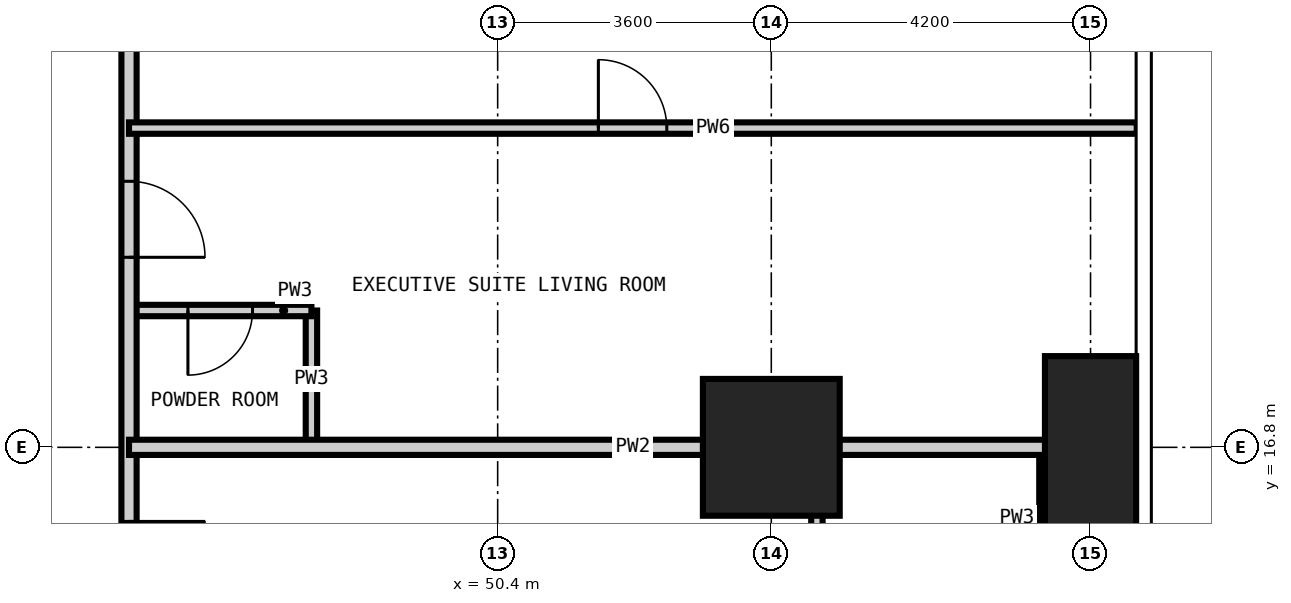
"""IFC4 building model, lengths in metres.
Left out: names, types, materials, properties, quantities, classifications, styles, units other than length and angle.
Written with IfcOpenShell. Run it as: python <this file> out.ifc"""

import sys

from ifc_helpers import new_model, si_unit, direction, frame, frame_2d, origin, origin_2d, place, context, subcontext, project, spatial, rectangle, extrude, element, fill, save


model = new_model("IFC4")
c1 = context("Model", 3, precision=1e-05, world=origin(), true_north=direction((0.0, 1.0)))
c2 = subcontext(c1, "Body", "Model", "MODEL_VIEW")
j1 = project(units=[si_unit("LENGTHUNIT", "METRE"), si_unit("PLANEANGLEUNIT", "RADIAN")], contexts=[c1])
p1 = place(None, origin())
s1 = spatial("IfcSite", under=j1, at=p1, CompositionType="ELEMENT")
p2 = place(p1, origin())
s2 = spatial("IfcBuilding", under=s1, at=p2, CompositionType="ELEMENT")
p3 = place(p2, frame((0.0, 0.0, 55.8)))
s3 = spatial("IfcBuildingStorey", under=s2, at=p3, CompositionType="ELEMENT", Elevation=55.8)
p4 = place(p3, frame((54.0, 16.8, -0.35), z_axis=(0.0, 0.0, 1.0), x_axis=(1.0, 0.0, 0.0)))
e1 = element("IfcColumn", 1, at=p4, inside=s3, PredefinedType="COLUMN", context=c2, shape_type="SweptSolid", body=[
    extrude(rectangle(XDim=1.8, YDim=1.8, at=origin_2d()), origin(), (0.0, 0.0, 1.0), 3.6),
])
p5 = place(p3, frame((58.2, 16.8, -0.35), z_axis=(0.0, 0.0, 1.0), x_axis=(1.0, 0.0, 0.0)))
e2 = element("IfcColumn", 2, at=p5, inside=s3, PredefinedType="COLUMN", context=c2, shape_type="SweptSolid", body=[
    extrude(rectangle(XDim=1.2, YDim=2.4, at=origin_2d()), origin(), (0.0, 0.0, 1.0), 3.6),
])
p6 = place(p3, frame((47.95, 16.8, 0.0), z_axis=(0.0, 0.0, 1.0), x_axis=(0.0, 1.0, 0.0)))
e3 = element("IfcWall", 3, at=p6, inside=s3, PredefinedType="PARTITIONING", context=c2, shape_type="SweptSolid", body=[
    extrude(rectangle(XDim=1.8, YDim=0.15, at=frame_2d((0.9, 0.0))), origin(), (0.0, 0.0, 1.0), 3.25),
])
p7 = place(p3, frame((57.6, 13.2, 0.0), z_axis=(0.0, 0.0, 1.0), x_axis=(0.0, 1.0, 0.0)))
e4 = element("IfcWall", 4, at=p7, inside=s3, PredefinedType="PARTITIONING", context=c2, shape_type="SweptSolid", body=[
    extrude(rectangle(XDim=3.6, YDim=0.15, at=frame_2d((1.8, 0.0))), origin(), (0.0, 0.0, 1.0), 3.25),
])
p8 = place(p7, frame((1.375, 0.0, 0.0)))
e5 = element("IfcOpeningElement", 5, at=p8, cuts=e4, PredefinedType="OPENING", context=c2, shape_type="SweptSolid", body=[
    extrude(rectangle(XDim=0.85, YDim=2.1, at=frame_2d((0.425, 1.05))), frame((0.0, 0.085, 0.0), z_axis=(0.0, -1.0, 0.0), x_axis=(1.0, 0.0, 0.0)), (0.0, 0.0, 1.0), 0.17),
])
p9 = place(p3, frame((45.55, 18.6, 0.0), z_axis=(0.0, 0.0, 1.0), x_axis=(1.0, 0.0, 0.0)))
e6 = element("IfcWall", 6, at=p9, inside=s3, PredefinedType="PARTITIONING", context=c2, shape_type="SweptSolid", body=[
    extrude(rectangle(XDim=2.4, YDim=0.15, at=frame_2d((1.2, 0.0))), origin(), (0.0, 0.0, 1.0), 3.25),
])
p10 = place(p9, frame((0.775, 0.0, 0.0)))
e7 = element("IfcOpeningElement", 7, at=p10, cuts=e6, PredefinedType="OPENING", context=c2, shape_type="SweptSolid", body=[
    extrude(rectangle(XDim=0.85, YDim=2.1, at=frame_2d((0.425, 1.05))), frame((0.0, 0.085, 0.0), z_axis=(0.0, -1.0, 0.0), x_axis=(1.0, 0.0, 0.0)), (0.0, 0.0, 1.0), 0.17),
])
p11 = place(p3, frame((45.55, 46.15, 0.0), z_axis=(0.0, 0.0, 1.0), x_axis=(0.0, -1.0, 0.0)))
e8 = element("IfcWall", 8, at=p11, inside=s3, PredefinedType="PARTITIONING", context=c2, shape_type="SweptSolid", body=[
    extrude(rectangle(XDim=32.3, YDim=0.2, at=frame_2d((16.15, 0.0))), origin(), (0.0, 0.0, 1.0), 3.25),
])
p12 = place(p11, frame((25.85, 0.0, 0.0)))
e9 = element("IfcOpeningElement", 9, at=p12, cuts=e8, PredefinedType="OPENING", context=c2, shape_type="SweptSolid", body=[
    extrude(rectangle(XDim=1.0, YDim=2.2, at=frame_2d((0.5, 1.1))), frame((0.0, 0.11, 0.0), z_axis=(0.0, -1.0, 0.0), x_axis=(1.0, 0.0, 0.0)), (0.0, 0.0, 1.0), 0.22),
])
p13 = place(p11, frame((17.45, 0.0, 0.0)))
e10 = element("IfcOpeningElement", 10, at=p13, cuts=e8, PredefinedType="OPENING", context=c2, shape_type="SweptSolid", body=[
    extrude(rectangle(XDim=1.0, YDim=2.2, at=frame_2d((0.5, 1.1))), frame((0.0, 0.11, 0.0), z_axis=(0.0, -1.0, 0.0), x_axis=(1.0, 0.0, 0.0)), (0.0, 0.0, 1.0), 0.22),
])
p14 = place(p11, frame((9.05, 0.0, 0.0)))
e11 = element("IfcOpeningElement", 11, at=p14, cuts=e8, PredefinedType="OPENING", context=c2, shape_type="SweptSolid", body=[
    extrude(rectangle(XDim=1.0, YDim=2.2, at=frame_2d((0.5, 1.1))), frame((0.0, 0.11, 0.0), z_axis=(0.0, -1.0, 0.0), x_axis=(1.0, 0.0, 0.0)), (0.0, 0.0, 1.0), 0.22),
])
p15 = place(p11, frame((30.325, 0.0, 0.0)))
e12 = element("IfcOpeningElement", 12, at=p15, cuts=e8, PredefinedType="OPENING", context=c2, shape_type="SweptSolid", body=[
    extrude(rectangle(XDim=1.0, YDim=2.2, at=frame_2d((0.5, 1.1))), frame((0.0, 0.11, 0.0), z_axis=(0.0, -1.0, 0.0), x_axis=(1.0, 0.0, 0.0)), (0.0, 0.0, 1.0), 0.22),
])
p16 = place(p11, frame((1.575, 0.0, 0.0)))
e13 = element("IfcOpeningElement", 13, at=p16, cuts=e8, PredefinedType="OPENING", context=c2, shape_type="SweptSolid", body=[
    extrude(rectangle(XDim=1.0, YDim=2.2, at=frame_2d((0.5, 1.1))), frame((0.0, 0.11, 0.0), z_axis=(0.0, -1.0, 0.0), x_axis=(1.0, 0.0, 0.0)), (0.0, 0.0, 1.0), 0.22),
])
p17 = place(p3, frame((45.55, 16.8, 0.0), z_axis=(0.0, 0.0, 1.0), x_axis=(1.0, 0.0, 0.0)))
e14 = element("IfcWall", 14, at=p17, inside=s3, PredefinedType="PARTITIONING", context=c2, shape_type="SweptSolid", body=[
    extrude(rectangle(XDim=13.258, YDim=0.2, at=frame_2d((6.629, 0.0))), origin(), (0.0, 0.0, 1.0), 3.25),
])
p18 = place(p3, frame((54.6, -0.008, 0.0), z_axis=(0.0, 0.0, 1.0), x_axis=(0.0, 1.0, 0.0)))
e15 = element("IfcWall", 15, at=p18, inside=s3, PredefinedType="PARTITIONING", context=c2, shape_type="SweptSolid", body=[
    extrude(rectangle(XDim=16.808, YDim=0.15, at=frame_2d((8.404, 0.0))), origin(), (0.0, 0.0, 1.0), 3.25),
])
p19 = place(p18, frame((4.958, 0.0, 0.0)))
e16 = element("IfcOpeningElement", 16, at=p19, cuts=e15, PredefinedType="OPENING", context=c2, shape_type="SweptSolid", body=[
    extrude(rectangle(XDim=0.9, YDim=2.1, at=frame_2d((0.45, 1.05))), frame((0.0, 0.085, 0.0), z_axis=(0.0, -1.0, 0.0), x_axis=(1.0, 0.0, 0.0)), (0.0, 0.0, 1.0), 0.17),
])
p20 = place(p3, frame((45.55, 21.0, 0.0), z_axis=(0.0, 0.0, 1.0), x_axis=(1.0, 0.0, 0.0)))
e17 = element("IfcWall", 17, at=p20, inside=s3, PredefinedType="PARTITIONING", context=c2, shape_type="SweptSolid", body=[
    extrude(rectangle(XDim=13.258, YDim=0.15, at=frame_2d((6.629, 0.0))), origin(), (0.0, 0.0, 1.0), 3.25),
])
p21 = place(p20, frame((6.175, 0.0, 0.0)))
e18 = element("IfcOpeningElement", 18, at=p21, cuts=e17, PredefinedType="OPENING", context=c2, shape_type="SweptSolid", body=[
    extrude(rectangle(XDim=0.9, YDim=2.1, at=frame_2d((0.45, 1.05))), frame((0.0, 0.085, 0.0), z_axis=(0.0, -1.0, 0.0), x_axis=(1.0, 0.0, 0.0)), (0.0, 0.0, 1.0), 0.17),
])
p22 = place(p12, origin())
e19 = element("IfcDoor", 19, at=p22, inside=s3, OperationType="SINGLE_SWING_RIGHT", PredefinedType="DOOR", context=c2, shape_type="SweptSolid", body=[
    extrude(rectangle(XDim=1.0, YDim=2.2, at=frame_2d((0.5, 1.1))), frame((0.0, 0.025, 0.0), z_axis=(0.0, -1.0, 0.0), x_axis=(1.0, 0.0, 0.0)), (0.0, 0.0, 1.0), 0.05),
])
fill(e9, e19)
p23 = place(p10, frame((0.85, 0.0, 0.0), z_axis=(0.0, 0.0, 1.0), x_axis=(-1.0, 0.0, 0.0)))
e20 = element("IfcDoor", 20, at=p23, inside=s3, OperationType="SINGLE_SWING_RIGHT", PredefinedType="DOOR", context=c2, shape_type="SweptSolid", body=[
    extrude(rectangle(XDim=0.85, YDim=2.1, at=frame_2d((0.425, 1.05))), frame((0.0, 0.025, 0.0), z_axis=(0.0, -1.0, 0.0), x_axis=(1.0, 0.0, 0.0)), (0.0, 0.0, 1.0), 0.05),
])
fill(e7, e20)
p24 = place(p21, origin())
e21 = element("IfcDoor", 21, at=p24, inside=s3, OperationType="SINGLE_SWING_LEFT", PredefinedType="DOOR", context=c2, shape_type="SweptSolid", body=[
    extrude(rectangle(XDim=0.9, YDim=2.1, at=frame_2d((0.45, 1.05))), frame((0.0, 0.025, 0.0), z_axis=(0.0, -1.0, 0.0), x_axis=(1.0, 0.0, 0.0)), (0.0, 0.0, 1.0), 0.05),
])
fill(e18, e21)
p25 = place(p15, origin())
e22 = element("IfcDoor", 22, at=p25, inside=s3, OperationType="SINGLE_SWING_LEFT", PredefinedType="DOOR", context=c2, shape_type="SweptSolid", body=[
    extrude(rectangle(XDim=1.0, YDim=2.2, at=frame_2d((0.5, 1.1))), frame((0.0, 0.025, 0.0), z_axis=(0.0, -1.0, 0.0), x_axis=(1.0, 0.0, 0.0)), (0.0, 0.0, 1.0), 0.05),
])
fill(e12, e22)
save(model, sys.argv[1])
